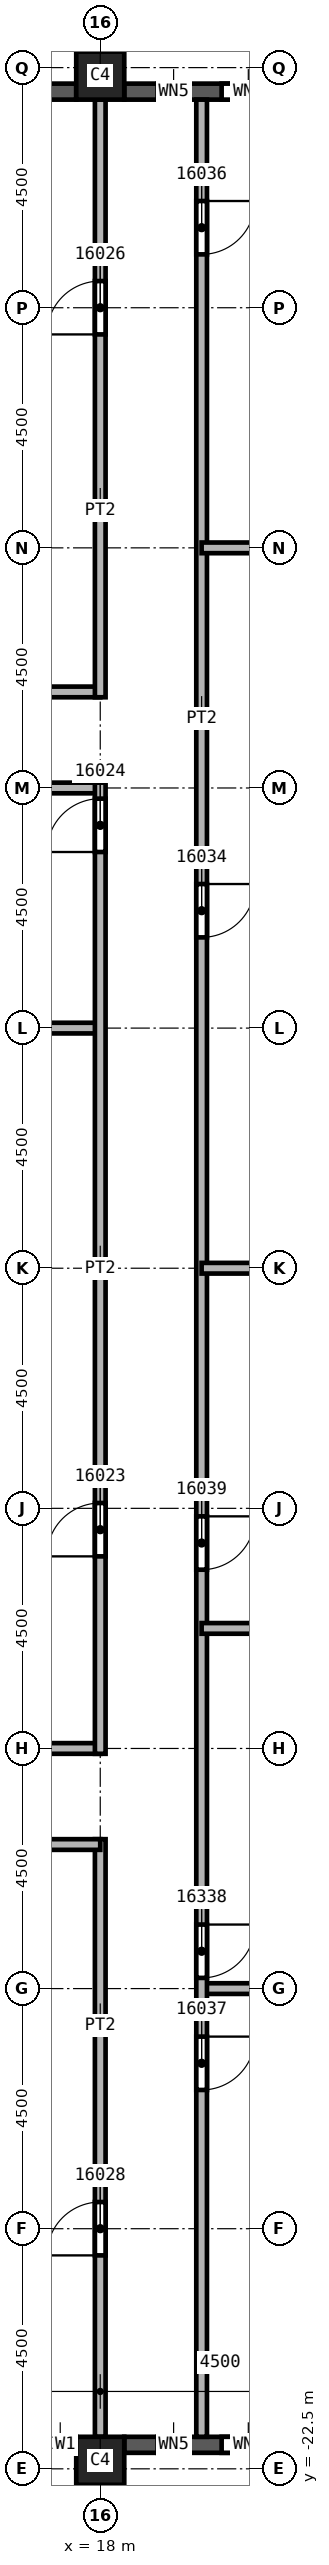
"""IFC4 building model, lengths in metres.
Left out: names, types, materials, properties, quantities, classifications, styles, units other than length and angle.
Written with IfcOpenShell. Run it as: python <this file> out.ifc"""

import sys

from ifc_helpers import new_model, si_unit, direction, frame, frame_2d, origin, origin_2d, place, context, subcontext, project, spatial, rectangle, extrude, element, fill, save


model = new_model("IFC4")
c1 = context("Model", 3, precision=1e-05, world=origin(), true_north=direction((0.0, 1.0)))
c2 = subcontext(c1, "Body", "Model", "MODEL_VIEW")
j1 = project(units=[si_unit("LENGTHUNIT", "METRE"), si_unit("PLANEANGLEUNIT", "RADIAN")], contexts=[c1])
p1 = place(None, origin())
s1 = spatial("IfcSite", under=j1, at=p1, CompositionType="ELEMENT")
p2 = place(p1, origin())
s2 = spatial("IfcBuilding", under=s1, at=p2, CompositionType="ELEMENT")
p3 = place(p2, frame((0.0, 0.0, 246.0)))
s3 = spatial("IfcBuildingStorey", under=s2, at=p3, CompositionType="ELEMENT", Elevation=246.0)
for number, where, z_axis, x_axis in (
    (1, (18.0, 22.35, 0.0), (0.0, 0.0, 1.0), (1.0, 0.0, 0.0)),
    (2, (18.0, -22.35, 0.0), (0.0, 0.0, 1.0), (1.0, 0.0, 0.0)),
):
    element("IfcColumn", number, at=place(p3, frame(where, z_axis=z_axis, x_axis=x_axis)), inside=s3, PredefinedType="COLUMN", context=c2, shape_type="SweptSolid", body=[
        extrude(rectangle(XDim=0.9, YDim=0.9, at=origin_2d()), origin(), (0.0, 0.0, 1.0), 3.72),
    ])
p4 = place(p3, frame((13.95, -22.05, 0.0), z_axis=(0.0, 0.0, 1.0), x_axis=(1.0, 0.0, 0.0)))
e3 = element("IfcWall", 3, at=p4, inside=s3, PredefinedType="SOLIDWALL", context=c2, shape_type="SweptSolid", body=[
    extrude(rectangle(XDim=3.6, YDim=0.3, at=frame_2d((1.8, 0.0))), origin(), (0.0, 0.0, 1.0), 3.12),
])
p5 = place(p4, frame((0.6, 0.0, 0.8)))
e4 = element("IfcOpeningElement", 4, at=p5, cuts=e3, PredefinedType="OPENING", context=c2, shape_type="SweptSolid", body=[
    extrude(rectangle(XDim=2.4, YDim=1.95, at=frame_2d((1.2, 0.975))), frame((0.0, 0.15, 0.0), z_axis=(0.0, -1.0, 0.0), x_axis=(1.0, 0.0, 0.0)), (0.0, 0.0, 1.0), 0.3),
])
p6 = place(p3, frame((18.45, -22.05, 0.0), z_axis=(0.0, 0.0, 1.0), x_axis=(1.0, 0.0, 0.0)))
e5 = element("IfcWall", 5, at=p6, inside=s3, PredefinedType="SOLIDWALL", context=c2, shape_type="SweptSolid", body=[
    extrude(rectangle(XDim=3.6, YDim=0.3, at=frame_2d((1.8, 0.0))), origin(), (0.0, 0.0, 1.0), 3.12),
])
p7 = place(p6, frame((0.625, 0.0, 0.8)))
e6 = element("IfcOpeningElement", 6, at=p7, cuts=e5, PredefinedType="OPENING", context=c2, shape_type="SweptSolid", body=[
    extrude(rectangle(XDim=0.6, YDim=1.95, at=frame_2d((0.3, 0.975))), frame((0.0, 0.15, 0.0), z_axis=(0.0, -1.0, 0.0), x_axis=(1.0, 0.0, 0.0)), (0.0, 0.0, 1.0), 0.3),
])
p8 = place(p6, frame((1.825, 0.0, 0.8)))
e7 = element("IfcOpeningElement", 7, at=p8, cuts=e5, PredefinedType="OPENING", context=c2, shape_type="SweptSolid", body=[
    extrude(rectangle(XDim=1.0, YDim=1.95, at=frame_2d((0.5, 0.975))), frame((0.0, 0.15, 0.0), z_axis=(0.0, -1.0, 0.0), x_axis=(1.0, 0.0, 0.0)), (0.0, 0.0, 1.0), 0.3),
])
p9 = place(p3, frame((22.05, 22.05, 0.0), z_axis=(0.0, 0.0, 1.0), x_axis=(-1.0, 0.0, 0.0)))
e8 = element("IfcWall", 8, at=p9, inside=s3, PredefinedType="SOLIDWALL", context=c2, shape_type="SweptSolid", body=[
    extrude(rectangle(XDim=3.6, YDim=0.3, at=frame_2d((1.8, 0.0))), origin(), (0.0, 0.0, 1.0), 3.12),
])
p10 = place(p9, frame((0.775, 0.0, 0.8)))
e9 = element("IfcOpeningElement", 9, at=p10, cuts=e8, PredefinedType="OPENING", context=c2, shape_type="SweptSolid", body=[
    extrude(rectangle(XDim=1.0, YDim=1.95, at=frame_2d((0.5, 0.975))), frame((0.0, 0.15, 0.0), z_axis=(0.0, -1.0, 0.0), x_axis=(1.0, 0.0, 0.0)), (0.0, 0.0, 1.0), 0.3),
])
p11 = place(p9, frame((2.375, 0.0, 0.8)))
e10 = element("IfcOpeningElement", 10, at=p11, cuts=e8, PredefinedType="OPENING", context=c2, shape_type="SweptSolid", body=[
    extrude(rectangle(XDim=0.6, YDim=1.95, at=frame_2d((0.3, 0.975))), frame((0.0, 0.15, 0.0), z_axis=(0.0, -1.0, 0.0), x_axis=(1.0, 0.0, 0.0)), (0.0, 0.0, 1.0), 0.3),
])
p12 = place(p3, frame((17.55, 22.05, 0.0), z_axis=(0.0, 0.0, 1.0), x_axis=(-1.0, 0.0, 0.0)))
e11 = element("IfcWall", 11, at=p12, inside=s3, PredefinedType="SOLIDWALL", context=c2, shape_type="SweptSolid", body=[
    extrude(rectangle(XDim=3.6, YDim=0.3, at=frame_2d((1.8, 0.0))), origin(), (0.0, 0.0, 1.0), 3.12),
])
p13 = place(p12, frame((0.6, 0.0, 0.8)))
e12 = element("IfcOpeningElement", 12, at=p13, cuts=e11, PredefinedType="OPENING", context=c2, shape_type="SweptSolid", body=[
    extrude(rectangle(XDim=2.4, YDim=1.95, at=frame_2d((1.2, 0.975))), frame((0.0, 0.15, 0.0), z_axis=(0.0, -1.0, 0.0), x_axis=(1.0, 0.0, 0.0)), (0.0, 0.0, 1.0), 0.3),
])
for number, where, z_axis, x_axis in (
    (13, (13.5, -9.0, 0.0), (0.0, 0.0, 1.0), (1.0, 0.0, 0.0)),
    (14, (13.5, 4.5, 0.0), (0.0, 0.0, 1.0), (1.0, 0.0, 0.0)),
    (15, (18.0, 9.0, 0.0), (0.0, 0.0, 1.0), (-1.0, 0.0, 0.0)),
):
    element("IfcWall", number, at=place(p3, frame(where, z_axis=z_axis, x_axis=x_axis)), inside=s3, PredefinedType="PARTITIONING", context=c2, shape_type="SweptSolid", body=[
        extrude(rectangle(XDim=4.5, YDim=0.2, at=frame_2d((2.25, 0.0))), origin(), (0.0, 0.0, 1.0), 3.72),
    ])
p14 = place(p3, frame((14.4, 10.8, 0.0), z_axis=(0.0, 0.0, 1.0), x_axis=(1.0, 0.0, 0.0)))
e16 = element("IfcWall", 16, at=p14, inside=s3, PredefinedType="PARTITIONING", context=c2, shape_type="SweptSolid", body=[
    extrude(rectangle(XDim=3.6, YDim=0.2, at=frame_2d((1.8, 0.0))), origin(), (0.0, 0.0, 1.0), 3.72),
])
p15 = place(p3, frame((18.0, -21.9, 0.0), z_axis=(0.0, 0.0, 1.0), x_axis=(0.0, 1.0, 0.0)))
e17 = element("IfcWall", 17, at=p15, inside=s3, PredefinedType="PARTITIONING", context=c2, shape_type="SweptSolid", body=[
    extrude(rectangle(XDim=11.2, YDim=0.2, at=frame_2d((5.6, 0.0))), origin(), (0.0, 0.0, 1.0), 3.72),
])
p16 = place(p15, frame((3.4, 0.0, 0.0)))
e18 = element("IfcOpeningElement", 18, at=p16, cuts=e17, PredefinedType="OPENING", context=c2, shape_type="SweptSolid", body=[
    extrude(rectangle(XDim=1.0, YDim=2.1, at=frame_2d((0.5, 1.05))), frame((0.0, 0.1, 0.0), z_axis=(0.0, -1.0, 0.0), x_axis=(1.0, 0.0, 0.0)), (0.0, 0.0, 1.0), 0.2),
])
p17 = place(p3, frame((18.0, -10.8, 0.0), z_axis=(0.0, 0.0, 1.0), x_axis=(-1.0, 0.0, 0.0)))
e19 = element("IfcWall", 19, at=p17, inside=s3, PredefinedType="PARTITIONING", context=c2, shape_type="SweptSolid", body=[
    extrude(rectangle(XDim=3.6, YDim=0.2, at=frame_2d((1.8, 0.0))), origin(), (0.0, 0.0, 1.0), 3.72),
])
p18 = place(p3, frame((18.0, -9.1, 0.0), z_axis=(0.0, 0.0, 1.0), x_axis=(0.0, 1.0, 0.0)))
e20 = element("IfcWall", 20, at=p18, inside=s3, PredefinedType="PARTITIONING", context=c2, shape_type="SweptSolid", body=[
    extrude(rectangle(XDim=18.2, YDim=0.2, at=frame_2d((9.1, 0.0))), origin(), (0.0, 0.0, 1.0), 3.72),
])
p19 = place(p18, frame((3.7, 0.0, 0.0)))
e21 = element("IfcOpeningElement", 21, at=p19, cuts=e20, PredefinedType="OPENING", context=c2, shape_type="SweptSolid", body=[
    extrude(rectangle(XDim=1.0, YDim=2.1, at=frame_2d((0.5, 1.05))), frame((0.0, 0.1, 0.0), z_axis=(0.0, -1.0, 0.0), x_axis=(1.0, 0.0, 0.0)), (0.0, 0.0, 1.0), 0.2),
])
p20 = place(p18, frame((16.9, 0.0, 0.0)))
e22 = element("IfcOpeningElement", 22, at=p20, cuts=e20, PredefinedType="OPENING", context=c2, shape_type="SweptSolid", body=[
    extrude(rectangle(XDim=1.0, YDim=2.1, at=frame_2d((0.5, 1.05))), frame((0.0, 0.1, 0.0), z_axis=(0.0, -1.0, 0.0), x_axis=(1.0, 0.0, 0.0)), (0.0, 0.0, 1.0), 0.2),
])
p21 = place(p3, frame((18.0, 10.7, 0.0), z_axis=(0.0, 0.0, 1.0), x_axis=(0.0, 1.0, 0.0)))
e23 = element("IfcWall", 23, at=p21, inside=s3, PredefinedType="PARTITIONING", context=c2, shape_type="SweptSolid", body=[
    extrude(rectangle(XDim=11.2, YDim=0.2, at=frame_2d((5.6, 0.0))), origin(), (0.0, 0.0, 1.0), 3.72),
])
p22 = place(p21, frame((6.8, 0.0, 0.0)))
e24 = element("IfcOpeningElement", 24, at=p22, cuts=e23, PredefinedType="OPENING", context=c2, shape_type="SweptSolid", body=[
    extrude(rectangle(XDim=1.0, YDim=2.1, at=frame_2d((0.5, 1.05))), frame((0.0, 0.1, 0.0), z_axis=(0.0, -1.0, 0.0), x_axis=(1.0, 0.0, 0.0)), (0.0, 0.0, 1.0), 0.2),
])
p23 = place(p3, frame((19.9, -13.5, 0.0), z_axis=(0.0, 0.0, 1.0), x_axis=(1.0, 0.0, 0.0)))
e25 = element("IfcWall", 25, at=p23, inside=s3, PredefinedType="PARTITIONING", context=c2, shape_type="SweptSolid", body=[
    extrude(rectangle(XDim=6.65, YDim=0.2, at=frame_2d((3.325, 0.0))), origin(), (0.0, 0.0, 1.0), 3.72),
])
p24 = place(p3, frame((19.9, 21.9, 0.0), z_axis=(0.0, 0.0, 1.0), x_axis=(0.0, -1.0, 0.0)))
e26 = element("IfcWall", 26, at=p24, inside=s3, PredefinedType="PARTITIONING", context=c2, shape_type="SweptSolid", body=[
    extrude(rectangle(XDim=43.8, YDim=0.2, at=frame_2d((21.9, 0.0))), origin(), (0.0, 0.0, 1.0), 3.72),
])
p25 = place(p24, frame((14.7, 0.0, 0.0)))
e27 = element("IfcOpeningElement", 27, at=p25, cuts=e26, PredefinedType="OPENING", context=c2, shape_type="SweptSolid", body=[
    extrude(rectangle(XDim=1.0, YDim=2.1, at=frame_2d((0.5, 1.05))), frame((0.0, 0.1, 0.0), z_axis=(0.0, -1.0, 0.0), x_axis=(1.0, 0.0, 0.0)), (0.0, 0.0, 1.0), 0.2),
])
p26 = place(p24, frame((1.9, 0.0, 0.0)))
e28 = element("IfcOpeningElement", 28, at=p26, cuts=e26, PredefinedType="OPENING", context=c2, shape_type="SweptSolid", body=[
    extrude(rectangle(XDim=1.0, YDim=2.1, at=frame_2d((0.5, 1.05))), frame((0.0, 0.1, 0.0), z_axis=(0.0, -1.0, 0.0), x_axis=(1.0, 0.0, 0.0)), (0.0, 0.0, 1.0), 0.2),
])
p27 = place(p24, frame((36.3, 0.0, 0.0)))
e29 = element("IfcOpeningElement", 29, at=p27, cuts=e26, PredefinedType="OPENING", context=c2, shape_type="SweptSolid", body=[
    extrude(rectangle(XDim=1.0, YDim=2.1, at=frame_2d((0.5, 1.05))), frame((0.0, 0.1, 0.0), z_axis=(0.0, -1.0, 0.0), x_axis=(1.0, 0.0, 0.0)), (0.0, 0.0, 1.0), 0.2),
])
p28 = place(p24, frame((34.2, 0.0, 0.0)))
e30 = element("IfcOpeningElement", 30, at=p28, cuts=e26, PredefinedType="OPENING", context=c2, shape_type="SweptSolid", body=[
    extrude(rectangle(XDim=1.0, YDim=2.1, at=frame_2d((0.5, 1.05))), frame((0.0, 0.1, 0.0), z_axis=(0.0, -1.0, 0.0), x_axis=(1.0, 0.0, 0.0)), (0.0, 0.0, 1.0), 0.2),
])
p29 = place(p24, frame((26.55, 0.0, 0.0)))
e31 = element("IfcOpeningElement", 31, at=p29, cuts=e26, PredefinedType="OPENING", context=c2, shape_type="SweptSolid", body=[
    extrude(rectangle(XDim=1.0, YDim=2.1, at=frame_2d((0.5, 1.05))), frame((0.0, 0.1, 0.0), z_axis=(0.0, -1.0, 0.0), x_axis=(1.0, 0.0, 0.0)), (0.0, 0.0, 1.0), 0.2),
])
for number, where, z_axis, x_axis in (
    (32, (19.9, -6.75, 0.0), (0.0, 0.0, 1.0), (1.0, 0.0, 0.0)),
    (33, (19.9, 13.5, 0.0), (0.0, 0.0, 1.0), (1.0, 0.0, 0.0)),
    (34, (26.55, 0.0, 0.0), (0.0, 0.0, 1.0), (-1.0, 0.0, 0.0)),
):
    element("IfcWall", number, at=place(p3, frame(where, z_axis=z_axis, x_axis=x_axis)), inside=s3, PredefinedType="PARTITIONING", context=c2, shape_type="SweptSolid", body=[
        extrude(rectangle(XDim=6.65, YDim=0.2, at=frame_2d((3.325, 0.0))), origin(), (0.0, 0.0, 1.0), 3.72),
    ])
p30 = place(p19, origin())
e35 = element("IfcDoor", 35, at=p30, inside=s3, OperationType="SINGLE_SWING_RIGHT", PredefinedType="DOOR", context=c2, shape_type="SweptSolid", body=[
    extrude(rectangle(XDim=1.0, YDim=2.1, at=frame_2d((0.5, 1.05))), frame((0.0, 0.025, 0.0), z_axis=(0.0, -1.0, 0.0), x_axis=(1.0, 0.0, 0.0)), (0.0, 0.0, 1.0), 0.05),
])
fill(e21, e35)
p31 = place(p20, origin())
e36 = element("IfcDoor", 36, at=p31, inside=s3, OperationType="SINGLE_SWING_LEFT", PredefinedType="DOOR", context=c2, shape_type="SweptSolid", body=[
    extrude(rectangle(XDim=1.0, YDim=2.1, at=frame_2d((0.5, 1.05))), frame((0.0, 0.025, 0.0), z_axis=(0.0, -1.0, 0.0), x_axis=(1.0, 0.0, 0.0)), (0.0, 0.0, 1.0), 0.05),
])
fill(e22, e36)
p32 = place(p22, origin())
e37 = element("IfcDoor", 37, at=p32, inside=s3, OperationType="SINGLE_SWING_LEFT", PredefinedType="DOOR", context=c2, shape_type="SweptSolid", body=[
    extrude(rectangle(XDim=1.0, YDim=2.1, at=frame_2d((0.5, 1.05))), frame((0.0, 0.025, 0.0), z_axis=(0.0, -1.0, 0.0), x_axis=(1.0, 0.0, 0.0)), (0.0, 0.0, 1.0), 0.05),
])
fill(e24, e37)
p33 = place(p16, origin())
e38 = element("IfcDoor", 38, at=p33, inside=s3, OperationType="SINGLE_SWING_LEFT", PredefinedType="DOOR", context=c2, shape_type="SweptSolid", body=[
    extrude(rectangle(XDim=1.0, YDim=2.1, at=frame_2d((0.5, 1.05))), frame((0.0, 0.025, 0.0), z_axis=(0.0, -1.0, 0.0), x_axis=(1.0, 0.0, 0.0)), (0.0, 0.0, 1.0), 0.05),
])
fill(e18, e38)
p34 = place(p25, origin())
e39 = element("IfcDoor", 39, at=p34, inside=s3, OperationType="SINGLE_SWING_LEFT", PredefinedType="DOOR", context=c2, shape_type="SweptSolid", body=[
    extrude(rectangle(XDim=1.0, YDim=2.1, at=frame_2d((0.5, 1.05))), frame((0.0, 0.025, 0.0), z_axis=(0.0, -1.0, 0.0), x_axis=(1.0, 0.0, 0.0)), (0.0, 0.0, 1.0), 0.05),
])
fill(e27, e39)
p35 = place(p26, origin())
e40 = element("IfcDoor", 40, at=p35, inside=s3, OperationType="SINGLE_SWING_LEFT", PredefinedType="DOOR", context=c2, shape_type="SweptSolid", body=[
    extrude(rectangle(XDim=1.0, YDim=2.1, at=frame_2d((0.5, 1.05))), frame((0.0, 0.025, 0.0), z_axis=(0.0, -1.0, 0.0), x_axis=(1.0, 0.0, 0.0)), (0.0, 0.0, 1.0), 0.05),
])
fill(e28, e40)
p36 = place(p27, origin())
e41 = element("IfcDoor", 41, at=p36, inside=s3, OperationType="SINGLE_SWING_RIGHT", PredefinedType="DOOR", context=c2, shape_type="SweptSolid", body=[
    extrude(rectangle(XDim=1.0, YDim=2.1, at=frame_2d((0.5, 1.05))), frame((0.0, 0.025, 0.0), z_axis=(0.0, -1.0, 0.0), x_axis=(1.0, 0.0, 0.0)), (0.0, 0.0, 1.0), 0.05),
])
fill(e29, e41)
p37 = place(p28, origin())
e42 = element("IfcDoor", 42, at=p37, inside=s3, OperationType="SINGLE_SWING_LEFT", PredefinedType="DOOR", context=c2, shape_type="SweptSolid", body=[
    extrude(rectangle(XDim=1.0, YDim=2.1, at=frame_2d((0.5, 1.05))), frame((0.0, 0.025, 0.0), z_axis=(0.0, -1.0, 0.0), x_axis=(1.0, 0.0, 0.0)), (0.0, 0.0, 1.0), 0.05),
])
fill(e30, e42)
p38 = place(p29, origin())
e43 = element("IfcDoor", 43, at=p38, inside=s3, OperationType="SINGLE_SWING_RIGHT", PredefinedType="DOOR", context=c2, shape_type="SweptSolid", body=[
    extrude(rectangle(XDim=1.0, YDim=2.1, at=frame_2d((0.5, 1.05))), frame((0.0, 0.025, 0.0), z_axis=(0.0, -1.0, 0.0), x_axis=(1.0, 0.0, 0.0)), (0.0, 0.0, 1.0), 0.05),
])
fill(e31, e43)
p39 = place(p7, origin())
e44 = element("IfcWindow", 44, at=p39, inside=s3, PartitioningType="SINGLE_PANEL", PredefinedType="WINDOW", context=c2, shape_type="SweptSolid", body=[
    extrude(rectangle(XDim=0.6, YDim=1.95, at=frame_2d((0.3, 0.975))), frame((0.0, 0.03, 0.0), z_axis=(0.0, -1.0, 0.0), x_axis=(1.0, 0.0, 0.0)), (0.0, 0.0, 1.0), 0.06),
])
fill(e6, e44)
p40 = place(p8, origin())
e45 = element("IfcWindow", 45, at=p40, inside=s3, PartitioningType="SINGLE_PANEL", PredefinedType="WINDOW", context=c2, shape_type="SweptSolid", body=[
    extrude(rectangle(XDim=1.0, YDim=1.95, at=frame_2d((0.5, 0.975))), frame((0.0, 0.03, 0.0), z_axis=(0.0, -1.0, 0.0), x_axis=(1.0, 0.0, 0.0)), (0.0, 0.0, 1.0), 0.06),
])
fill(e7, e45)
p41 = place(p10, origin())
e46 = element("IfcWindow", 46, at=p41, inside=s3, PartitioningType="SINGLE_PANEL", PredefinedType="WINDOW", context=c2, shape_type="SweptSolid", body=[
    extrude(rectangle(XDim=1.0, YDim=1.95, at=frame_2d((0.5, 0.975))), frame((0.0, 0.03, 0.0), z_axis=(0.0, -1.0, 0.0), x_axis=(1.0, 0.0, 0.0)), (0.0, 0.0, 1.0), 0.06),
])
fill(e9, e46)
p42 = place(p11, origin())
e47 = element("IfcWindow", 47, at=p42, inside=s3, PartitioningType="SINGLE_PANEL", PredefinedType="WINDOW", context=c2, shape_type="SweptSolid", body=[
    extrude(rectangle(XDim=0.6, YDim=1.95, at=frame_2d((0.3, 0.975))), frame((0.0, 0.03, 0.0), z_axis=(0.0, -1.0, 0.0), x_axis=(1.0, 0.0, 0.0)), (0.0, 0.0, 1.0), 0.06),
])
fill(e10, e47)
save(model, sys.argv[1])
